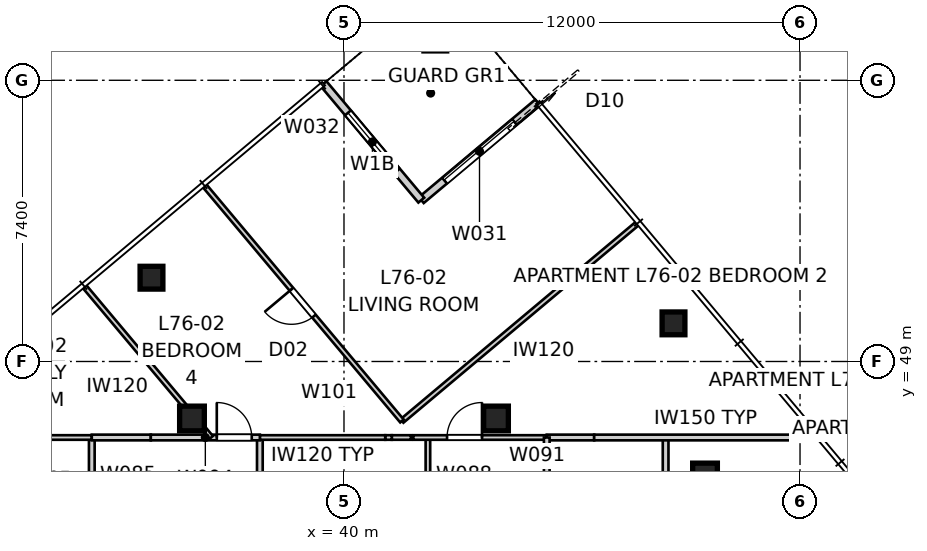
"""IFC4 building model, lengths in metres.
Left out: names, types, materials, properties, quantities, classifications, styles, units other than length and angle.
Written with IfcOpenShell. Run it as: python <this file> out.ifc"""

import sys

from ifc_helpers import new_model, si_unit, direction, frame, frame_2d, origin, origin_2d, place, context, subcontext, project, spatial, rectangle, extrude, element, fill, save


model = new_model("IFC4")
c1 = context("Model", 3, precision=1e-05, world=origin(), true_north=direction((0.0, 1.0)))
c2 = subcontext(c1, "Body", "Model", "MODEL_VIEW")
j1 = project(units=[si_unit("LENGTHUNIT", "METRE"), si_unit("PLANEANGLEUNIT", "RADIAN")], contexts=[c1])
p1 = place(None, origin())
s1 = spatial("IfcSite", under=j1, at=p1, CompositionType="ELEMENT")
p2 = place(p1, origin())
s2 = spatial("IfcBuilding", under=s1, at=p2, CompositionType="ELEMENT")
p3 = place(p2, frame((0.0, 0.0, 276.0)))
s3 = spatial("IfcBuildingStorey", under=s2, at=p3, CompositionType="ELEMENT", Elevation=276.0)
for number, where, z_axis, x_axis in (
    (1, (48.671, 50.003, 0.0), (0.0, 0.0, 1.0), (1.0, 0.0, 0.0)),
    (2, (34.935, 51.205, 0.0), (0.0, 0.0, 1.0), (1.0, 0.0, 0.0)),
):
    element("IfcColumn", number, at=place(p3, frame(where, z_axis=z_axis, x_axis=x_axis)), inside=s3, PredefinedType="COLUMN", context=c2, shape_type="SweptSolid", body=[
        extrude(rectangle(XDim=0.6, YDim=0.6, at=origin_2d()), origin(), (0.0, 0.0, 1.0), 3.4),
    ])
for number, where, z_axis, x_axis in (
    (3, (49.5, 46.0, 0.0), (0.0, 0.0, 1.0), (1.0, 0.0, 0.0)),
    (4, (44.0, 47.5, 0.0), (0.0, 0.0, 1.0), (1.0, 0.0, 0.0)),
    (5, (36.0, 47.5, 0.0), (0.0, 0.0, 1.0), (1.0, 0.0, 0.0)),
):
    element("IfcColumn", number, at=place(p3, frame(where, z_axis=z_axis, x_axis=x_axis)), inside=s3, PredefinedType="COLUMN", context=c2, shape_type="SweptSolid", body=[
        extrude(rectangle(XDim=0.65, YDim=0.65, at=origin_2d()), origin(), (0.0, 0.0, 1.0), 3.4),
    ])
p4 = place(p3, frame((45.098, 55.817, 0.0), z_axis=(0.0, 0.0, 1.0), x_axis=(-0.766060656284, -0.642768287094, 0.0)))
e6 = element("IfcWall", 6, at=p4, inside=s3, PredefinedType="SOLIDWALL", context=c2, shape_type="SweptSolid", body=[
    extrude(rectangle(XDim=4.0, YDim=0.2, at=frame_2d((2.0, 0.0))), origin(), (0.0, 0.0, 1.0), 3.25),
])
p5 = place(p4, frame((0.8, 0.0, 0.0)))
e7 = element("IfcOpeningElement", 7, at=p5, cuts=e6, PredefinedType="OPENING", context=c2, shape_type="SweptSolid", body=[
    extrude(rectangle(XDim=2.4, YDim=2.4, at=frame_2d((1.2, 1.2))), frame((0.0, 0.11, 0.0), z_axis=(0.0, -1.0, 0.0), x_axis=(1.0, 0.0, 0.0)), (0.0, 0.0, 1.0), 0.22),
])
p6 = place(p3, frame((42.034, 53.246, 0.0), z_axis=(0.0, 0.0, 1.0), x_axis=(-0.642798342015, 0.766035437498, 0.0)))
e8 = element("IfcWall", 8, at=p6, inside=s3, PredefinedType="SOLIDWALL", context=c2, shape_type="SweptSolid", body=[
    extrude(rectangle(XDim=4.0, YDim=0.2, at=frame_2d((2.0, 0.0))), origin(), (0.0, 0.0, 1.0), 3.25),
])
p7 = place(p6, frame((1.0, 0.0, 0.45)))
e9 = element("IfcOpeningElement", 9, at=p7, cuts=e8, PredefinedType="OPENING", context=c2, shape_type="SweptSolid", body=[
    extrude(rectangle(XDim=2.0, YDim=1.8, at=frame_2d((1.0, 0.9))), frame((0.0, 0.11, 0.0), z_axis=(0.0, -1.0, 0.0), x_axis=(1.0, 0.0, 0.0)), (0.0, 0.0, 1.0), 0.22),
])
p8 = place(p3, frame((33.364, 47.0, 0.0), z_axis=(0.0, 0.0, 1.0), x_axis=(0.0, -1.0, 0.0)))
e10 = element("IfcWall", 10, at=p8, inside=s3, PredefinedType="SOLIDWALL", context=c2, shape_type="SweptSolid", body=[
    extrude(rectangle(XDim=4.9, YDim=0.15, at=frame_2d((2.45, 0.0))), origin(), (0.0, 0.0, 1.0), 3.25),
])
p9 = place(p8, frame((1.97, 0.0, 0.0)))
e11 = element("IfcOpeningElement", 11, at=p9, cuts=e10, PredefinedType="OPENING", context=c2, shape_type="SweptSolid", body=[
    extrude(rectangle(XDim=0.96, YDim=2.1, at=frame_2d((0.48, 1.05))), frame((0.0, 0.085, 0.0), z_axis=(0.0, -1.0, 0.0), x_axis=(1.0, 0.0, 0.0)), (0.0, 0.0, 1.0), 0.17),
])
p10 = place(p3, frame((28.43, 47.0, 0.0), z_axis=(0.0, 0.0, 1.0), x_axis=(1.0, 0.0, 0.0)))
e12 = element("IfcWall", 12, at=p10, inside=s3, PredefinedType="PARTITIONING", context=c2, shape_type="SweptSolid", body=[
    extrude(rectangle(XDim=4.934, YDim=0.12, at=frame_2d((2.467, 0.0))), origin(), (0.0, 0.0, 1.0), 3.25),
])
p11 = place(p10, frame((2.553, 0.0, 0.0)))
e13 = element("IfcOpeningElement", 13, at=p11, cuts=e12, PredefinedType="OPENING", context=c2, shape_type="SweptSolid", body=[
    extrude(rectangle(XDim=0.96, YDim=2.1, at=frame_2d((0.48, 1.05))), frame((0.0, 0.07, 0.0), z_axis=(0.0, -1.0, 0.0), x_axis=(1.0, 0.0, 0.0)), (0.0, 0.0, 1.0), 0.14),
])
p12 = place(p3, frame((37.786, 42.1, 0.0), z_axis=(0.0, 0.0, 1.0), x_axis=(0.0, 1.0, 0.0)))
e14 = element("IfcWall", 14, at=p12, inside=s3, PredefinedType="SOLIDWALL", context=c2, shape_type="SweptSolid", body=[
    extrude(rectangle(XDim=4.9, YDim=0.15, at=frame_2d((2.45, 0.0))), origin(), (0.0, 0.0, 1.0), 3.25),
])
p13 = place(p12, frame((1.97, 0.0, 0.0)))
e15 = element("IfcOpeningElement", 15, at=p13, cuts=e14, PredefinedType="OPENING", context=c2, shape_type="SweptSolid", body=[
    extrude(rectangle(XDim=0.96, YDim=2.1, at=frame_2d((0.48, 1.05))), frame((0.0, 0.085, 0.0), z_axis=(0.0, -1.0, 0.0), x_axis=(1.0, 0.0, 0.0)), (0.0, 0.0, 1.0), 0.17),
])
p14 = place(p3, frame((42.208, 47.0, 0.0), z_axis=(0.0, 0.0, 1.0), x_axis=(0.0, -1.0, 0.0)))
e16 = element("IfcWall", 16, at=p14, inside=s3, PredefinedType="PARTITIONING", context=c2, shape_type="SweptSolid", body=[
    extrude(rectangle(XDim=4.9, YDim=0.12, at=frame_2d((2.45, 0.0))), origin(), (0.0, 0.0, 1.0), 3.25),
])
p15 = place(p14, frame((1.97, 0.0, 0.0)))
e17 = element("IfcOpeningElement", 17, at=p15, cuts=e16, PredefinedType="OPENING", context=c2, shape_type="SweptSolid", body=[
    extrude(rectangle(XDim=0.96, YDim=2.1, at=frame_2d((0.48, 1.05))), frame((0.0, 0.07, 0.0), z_axis=(0.0, -1.0, 0.0), x_axis=(1.0, 0.0, 0.0)), (0.0, 0.0, 1.0), 0.14),
])
p16 = place(p3, frame((41.258, 47.0, 0.0), z_axis=(0.0, 0.0, 1.0), x_axis=(1.0, 0.0, 0.0)))
e18 = element("IfcWall", 18, at=p16, inside=s3, PredefinedType="PARTITIONING", context=c2, shape_type="SweptSolid", body=[
    extrude(rectangle(XDim=0.504, YDim=0.12, at=frame_2d((0.252, 0.0))), origin(), (0.0, 0.0, 1.0), 3.25),
])
p17 = place(p3, frame((41.824, 47.0, 0.0), z_axis=(0.0, 0.0, 1.0), x_axis=(1.0, 0.0, 0.0)))
e19 = element("IfcWall", 19, at=p17, inside=s3, PredefinedType="PARTITIONING", context=c2, shape_type="SweptSolid", body=[
    extrude(rectangle(XDim=3.511, YDim=0.12, at=frame_2d((1.756, 0.0))), origin(), (0.0, 0.0, 1.0), 3.25),
])
p18 = place(p17, frame((0.887, 0.0, 0.0)))
e20 = element("IfcOpeningElement", 20, at=p18, cuts=e19, PredefinedType="OPENING", context=c2, shape_type="SweptSolid", body=[
    extrude(rectangle(XDim=0.92, YDim=2.34, at=frame_2d((0.46, 1.17))), frame((0.0, 0.07, 0.0), z_axis=(0.0, -1.0, 0.0), x_axis=(1.0, 0.0, 0.0)), (0.0, 0.0, 1.0), 0.14),
])
p19 = place(p3, frame((37.786, 47.0, 0.0), z_axis=(0.0, 0.0, 1.0), x_axis=(1.0, 0.0, 0.0)))
e21 = element("IfcWall", 21, at=p19, inside=s3, PredefinedType="PARTITIONING", context=c2, shape_type="SweptSolid", body=[
    extrude(rectangle(XDim=3.299, YDim=0.12, at=frame_2d((1.65, 0.0))), origin(), (0.0, 0.0, 1.0), 3.25),
])
p20 = place(p3, frame((33.364, 47.0, 0.0), z_axis=(0.0, 0.0, 1.0), x_axis=(1.0, 0.0, 0.0)))
e22 = element("IfcWall", 22, at=p20, inside=s3, PredefinedType="SOLIDWALL", context=c2, shape_type="SweptSolid", body=[
    extrude(rectangle(XDim=1.553, YDim=0.15, at=frame_2d((0.776, 0.0))), origin(), (0.0, 0.0, 1.0), 2.549),
])
p21 = place(p3, frame((34.917, 47.0, 0.0), z_axis=(0.0, 0.0, 1.0), x_axis=(1.0, 0.0, 0.0)))
e23 = element("IfcWall", 23, at=p21, inside=s3, PredefinedType="SOLIDWALL", context=c2, shape_type="SweptSolid", body=[
    extrude(rectangle(XDim=2.869, YDim=0.15, at=frame_2d((1.435, 0.0))), origin(), (0.0, 0.0, 1.0), 3.25),
])
p22 = place(p21, frame((1.736, 0.0, 0.0)))
e24 = element("IfcOpeningElement", 24, at=p22, cuts=e23, PredefinedType="OPENING", context=c2, shape_type="SweptSolid", body=[
    extrude(rectangle(XDim=0.92, YDim=2.34, at=frame_2d((0.46, 1.17))), frame((0.0, 0.085, 0.0), z_axis=(0.0, -1.0, 0.0), x_axis=(1.0, 0.0, 0.0)), (0.0, 0.0, 1.0), 0.17),
])
p23 = place(p3, frame((48.463, 42.1, 0.0), z_axis=(0.0, 0.0, 1.0), x_axis=(0.0, 1.0, 0.0)))
e25 = element("IfcWall", 25, at=p23, inside=s3, PredefinedType="SOLIDWALL", context=c2, shape_type="SweptSolid", body=[
    extrude(rectangle(XDim=4.9, YDim=0.15, at=frame_2d((2.45, 0.0))), origin(), (0.0, 0.0, 1.0), 3.25),
])
p24 = place(p23, frame((1.99, 0.0, 0.0)))
e26 = element("IfcOpeningElement", 26, at=p24, cuts=e25, PredefinedType="OPENING", context=c2, shape_type="SweptSolid", body=[
    extrude(rectangle(XDim=0.92, YDim=2.34, at=frame_2d((0.46, 1.17))), frame((0.0, 0.085, 0.0), z_axis=(0.0, -1.0, 0.0), x_axis=(1.0, 0.0, 0.0)), (0.0, 0.0, 1.0), 0.17),
])
p25 = place(p3, frame((45.336, 47.0, 0.0), z_axis=(0.0, 0.0, 1.0), x_axis=(1.0, 0.0, 0.0)))
e27 = element("IfcWall", 27, at=p25, inside=s3, PredefinedType="SOLIDWALL", context=c2, shape_type="SweptSolid", body=[
    extrude(rectangle(XDim=1.248, YDim=0.15, at=frame_2d((0.624, 0.0))), origin(), (0.0, 0.0, 1.0), 2.549),
])
p26 = place(p3, frame((46.583, 47.0, 0.0), z_axis=(0.0, 0.0, 1.0), x_axis=(1.0, 0.0, 0.0)))
e28 = element("IfcWall", 28, at=p26, inside=s3, PredefinedType="SOLIDWALL", context=c2, shape_type="SweptSolid", body=[
    extrude(rectangle(XDim=5.86, YDim=0.15, at=frame_2d((2.93, 0.0))), origin(), (0.0, 0.0, 1.0), 3.25),
])
p27 = place(p3, frame((45.336, 47.0, 0.0), z_axis=(0.0, 0.0, 1.0), x_axis=(0.0, -1.0, 0.0)))
e29 = element("IfcWall", 29, at=p27, inside=s3, PredefinedType="SOLIDWALL", context=c2, shape_type="SweptSolid", body=[
    extrude(rectangle(XDim=4.9, YDim=0.15, at=frame_2d((2.45, 0.0))), origin(), (0.0, 0.0, 1.0), 3.25),
])
p28 = place(p27, frame((1.99, 0.0, 0.0)))
e30 = element("IfcOpeningElement", 30, at=p28, cuts=e29, PredefinedType="OPENING", context=c2, shape_type="SweptSolid", body=[
    extrude(rectangle(XDim=0.92, YDim=2.34, at=frame_2d((0.46, 1.17))), frame((0.0, 0.085, 0.0), z_axis=(0.0, -1.0, 0.0), x_axis=(1.0, 0.0, 0.0)), (0.0, 0.0, 1.0), 0.17),
])
p29 = place(p3, frame((47.719, 52.631, 0.0), z_axis=(0.0, 0.0, 1.0), x_axis=(-0.766033729027, -0.642800378028, 0.0)))
e31 = element("IfcWall", 31, at=p29, inside=s3, PredefinedType="PARTITIONING", context=c2, shape_type="SweptSolid", body=[
    extrude(rectangle(XDim=8.085, YDim=0.12, at=frame_2d((4.042, 0.0))), origin(), (0.0, 0.0, 1.0), 3.25),
])
p30 = place(p3, frame((41.525, 47.434, 0.0), z_axis=(0.0, 0.0, 1.0), x_axis=(-0.642800378028, 0.766033729027, 0.0)))
e32 = element("IfcWall", 32, at=p30, inside=s3, PredefinedType="PARTITIONING", context=c2, shape_type="SweptSolid", body=[
    extrude(rectangle(XDim=8.085, YDim=0.12, at=frame_2d((4.042, 0.0))), origin(), (0.0, 0.0, 1.0), 3.25),
])
p31 = place(p30, frame((3.603, 0.0, 0.0)))
e33 = element("IfcOpeningElement", 33, at=p31, cuts=e32, PredefinedType="OPENING", context=c2, shape_type="SweptSolid", body=[
    extrude(rectangle(XDim=0.92, YDim=2.34, at=frame_2d((0.46, 1.17))), frame((0.0, 0.07, 0.0), z_axis=(0.0, -1.0, 0.0), x_axis=(1.0, 0.0, 0.0)), (0.0, 0.0, 1.0), 0.14),
])
p32 = place(p3, frame((36.505, 47.0, 0.0), z_axis=(0.0, 0.0, 1.0), x_axis=(-0.642776136034, 0.76605407051, 0.0)))
e34 = element("IfcWall", 34, at=p32, inside=s3, PredefinedType="PARTITIONING", context=c2, shape_type="SweptSolid", body=[
    extrude(rectangle(XDim=5.191, YDim=0.12, at=frame_2d((2.595, 0.0))), origin(), (0.0, 0.0, 1.0), 3.25),
])
p33 = place(p3, frame((41.258, 47.0, 0.0), z_axis=(0.0, 0.0, 1.0), x_axis=(-1.0, 0.0, 0.0)))
e35 = element("IfcWall", 35, at=p33, inside=s3, PredefinedType="PARTITIONING", context=c2, shape_type="SweptSolid", body=[
    extrude(rectangle(XDim=0.172, YDim=0.12, at=frame_2d((0.086, 0.0))), origin(), (0.0, 0.0, 1.0), 3.25),
])
p34 = place(p5, origin())
e36 = element("IfcDoor", 36, at=p34, inside=s3, OperationType="SLIDING_TO_LEFT", PredefinedType="DOOR", context=c2, shape_type="SweptSolid", body=[
    extrude(rectangle(XDim=2.4, YDim=2.4, at=frame_2d((1.2, 1.2))), frame((0.0, 0.025, 0.0), z_axis=(0.0, -1.0, 0.0), x_axis=(1.0, 0.0, 0.0)), (0.0, 0.0, 1.0), 0.05),
])
fill(e7, e36)
p35 = place(p7, origin())
e37 = element("IfcWindow", 37, at=p35, inside=s3, PartitioningType="SINGLE_PANEL", PredefinedType="WINDOW", context=c2, shape_type="SweptSolid", body=[
    extrude(rectangle(XDim=2.0, YDim=1.8, at=frame_2d((1.0, 0.9))), frame((0.0, 0.03, 0.0), z_axis=(0.0, -1.0, 0.0), x_axis=(1.0, 0.0, 0.0)), (0.0, 0.0, 1.0), 0.06),
])
fill(e9, e37)
p36 = place(p22, origin())
e38 = element("IfcDoor", 38, at=p36, inside=s3, OperationType="SINGLE_SWING_LEFT", PredefinedType="DOOR", context=c2, shape_type="SweptSolid", body=[
    extrude(rectangle(XDim=0.92, YDim=2.34, at=frame_2d((0.46, 1.17))), frame((0.0, 0.025, 0.0), z_axis=(0.0, -1.0, 0.0), x_axis=(1.0, 0.0, 0.0)), (0.0, 0.0, 1.0), 0.05),
])
fill(e24, e38)
p37 = place(p18, origin())
e39 = element("IfcDoor", 39, at=p37, inside=s3, OperationType="SINGLE_SWING_RIGHT", PredefinedType="DOOR", context=c2, shape_type="SweptSolid", body=[
    extrude(rectangle(XDim=0.92, YDim=2.34, at=frame_2d((0.46, 1.17))), frame((0.0, 0.025, 0.0), z_axis=(0.0, -1.0, 0.0), x_axis=(1.0, 0.0, 0.0)), (0.0, 0.0, 1.0), 0.05),
])
fill(e20, e39)
p38 = place(p31, origin())
e40 = element("IfcDoor", 40, at=p38, inside=s3, OperationType="SINGLE_SWING_RIGHT", PredefinedType="DOOR", context=c2, shape_type="SweptSolid", body=[
    extrude(rectangle(XDim=0.92, YDim=2.34, at=frame_2d((0.46, 1.17))), frame((0.0, 0.025, 0.0), z_axis=(0.0, -1.0, 0.0), x_axis=(1.0, 0.0, 0.0)), (0.0, 0.0, 1.0), 0.05),
])
fill(e33, e40)
save(model, sys.argv[1])
